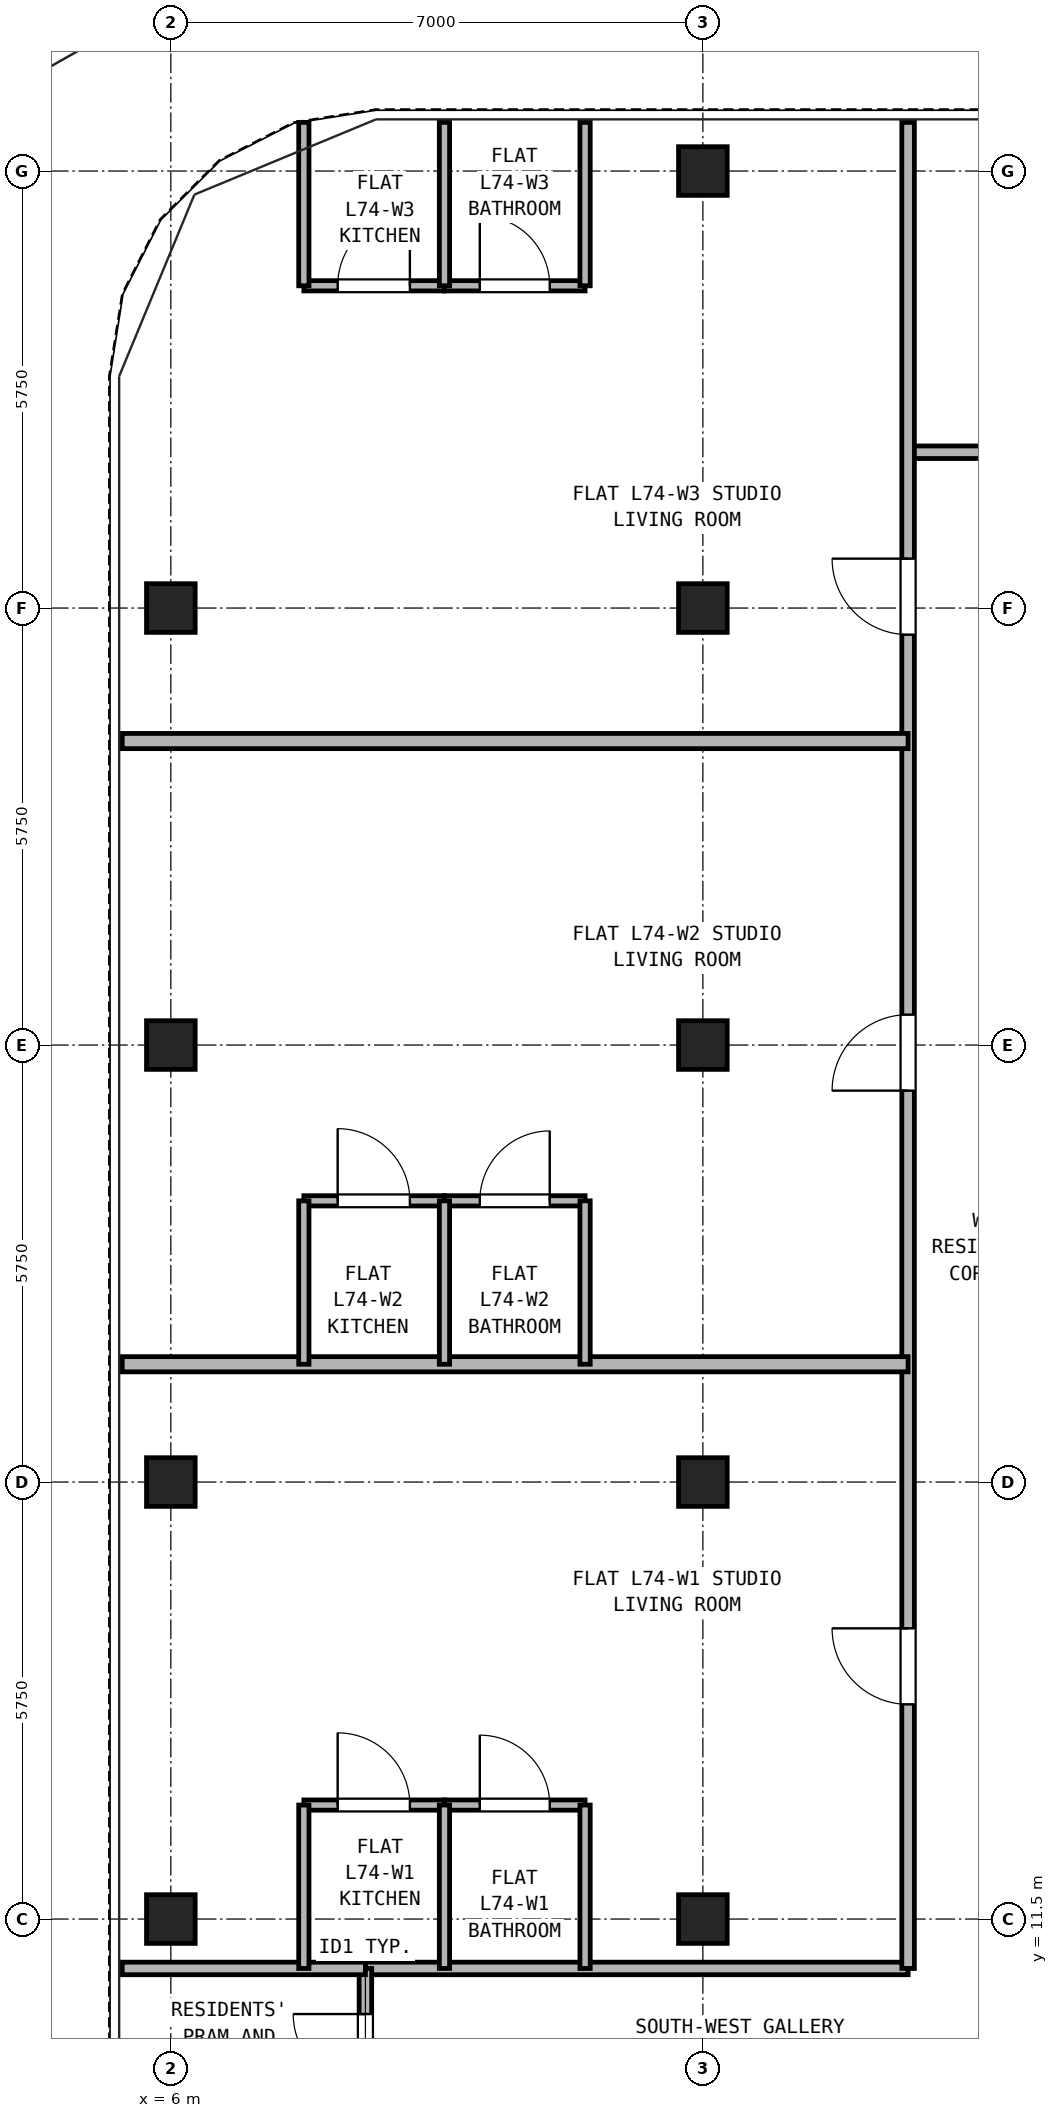
"""IFC4 building model, lengths in metres.
Left out: names, types, materials, properties, quantities, classifications, styles, units other than length and angle.
Written with IfcOpenShell. Run it as: python <this file> out.ifc"""

import sys

from ifc_helpers import new_model, si_unit, direction, frame, frame_2d, origin, origin_2d, place, context, subcontext, project, spatial, rectangle, hollow_rectangle, extrude, source, transform, mapped, element, fill, save


model = new_model("IFC4")
c1 = context("Model", 3, precision=1e-05, world=origin(), true_north=direction((0.0, 1.0)))
c2 = subcontext(c1, "Body", "Model", "MODEL_VIEW")
j1 = project(units=[si_unit("LENGTHUNIT", "METRE"), si_unit("PLANEANGLEUNIT", "RADIAN")], contexts=[c1])
p1 = place(None, origin())
s1 = spatial("IfcSite", under=j1, at=p1, CompositionType="ELEMENT")
p2 = place(p1, origin())
s2 = spatial("IfcBuilding", under=s1, at=p2, CompositionType="ELEMENT")
p3 = place(p2, frame((0.0, 0.0, 258.5)))
s3 = spatial("IfcBuildingStorey", under=s2, at=p3, CompositionType="ELEMENT", Elevation=258.5)
m1 = source(origin(), c2, "Body", "SweptSolid", [
    extrude(hollow_rectangle(XDim=0.64, YDim=0.64, WallThickness=0.035, at=origin_2d()), origin(), (0.0, 0.0, 1.0), 2.98),
])
for number, where, z_axis, x_axis in (
    (1, (13.0, 34.5, 0.0), (0.0, 0.0, 1.0), (1.0, 0.0, 0.0)),
    (2, (6.0, 11.5, 0.0), (0.0, 0.0, 1.0), (1.0, 0.0, 0.0)),
    (3, (6.0, 17.25, 0.0), (0.0, 0.0, 1.0), (1.0, 0.0, 0.0)),
    (4, (6.0, 23.0, 0.0), (0.0, 0.0, 1.0), (1.0, 0.0, 0.0)),
    (5, (6.0, 28.75, 0.0), (0.0, 0.0, 1.0), (1.0, 0.0, 0.0)),
    (6, (13.0, 11.5, 0.0), (0.0, 0.0, 1.0), (1.0, 0.0, 0.0)),
    (7, (13.0, 17.25, 0.0), (0.0, 0.0, 1.0), (1.0, 0.0, 0.0)),
    (8, (13.0, 23.0, 0.0), (0.0, 0.0, 1.0), (1.0, 0.0, 0.0)),
    (9, (13.0, 28.75, 0.0), (0.0, 0.0, 1.0), (1.0, 0.0, 0.0)),
):
    element("IfcColumn", number, at=place(p3, frame(where, z_axis=z_axis, x_axis=x_axis)), inside=s3, PredefinedType="COLUMN", context=c2, shape_type="MappedRepresentation", body=[
        mapped(m1, transform((0.0, 0.0, 0.0), x_axis=(1.0, 0.0, 0.0), y_axis=(0.0, 1.0, 0.0), z_axis=(0.0, 0.0, 1.0), scale=1.0)),
    ])
p4 = place(p3, frame((8.56, 10.85, 0.0), z_axis=(0.0, 0.0, 1.0), x_axis=(1.0, 0.0, 0.0)))
e10 = element("IfcWall", 10, at=p4, inside=s3, PredefinedType="PARTITIONING", context=c2, shape_type="SweptSolid", body=[
    extrude(rectangle(XDim=7.14, YDim=0.165, at=frame_2d((3.57, 0.0))), origin(), (0.0, 0.0, 1.0), 2.98),
])
p5 = place(p3, frame((8.56, 8.85, 0.0), z_axis=(0.0, 0.0, 1.0), x_axis=(0.0, 1.0, 0.0)))
e11 = element("IfcWall", 11, at=p5, inside=s3, PredefinedType="PARTITIONING", context=c2, shape_type="SweptSolid", body=[
    extrude(rectangle(XDim=2.0, YDim=0.165, at=frame_2d((1.0, 0.0))), origin(), (0.0, 0.0, 1.0), 2.98),
])
p6 = place(p5, frame((0.45, 0.0, 0.0)))
e12 = element("IfcOpeningElement", 12, at=p6, cuts=e11, PredefinedType="OPENING", context=c2, shape_type="SweptSolid", body=[
    extrude(rectangle(XDim=0.95, YDim=2.15, at=frame_2d((0.475, 1.075))), frame((0.0, 0.093, 0.0), z_axis=(0.0, -1.0, 0.0), x_axis=(1.0, 0.0, 0.0)), (0.0, 0.0, 1.0), 0.185),
])
p7 = place(p3, frame((15.7, 30.8, 0.0), z_axis=(0.0, 0.0, 1.0), x_axis=(1.0, 0.0, 0.0)))
e13 = element("IfcWall", 13, at=p7, inside=s3, PredefinedType="PARTITIONING", context=c2, shape_type="SweptSolid", body=[
    extrude(rectangle(XDim=15.6, YDim=0.165, at=frame_2d((7.8, 0.0))), origin(), (0.0, 0.0, 1.0), 2.98),
])
p8 = place(p7, frame((2.65, 0.0, 0.0)))
e14 = element("IfcOpeningElement", 14, at=p8, cuts=e13, PredefinedType="OPENING", context=c2, shape_type="SweptSolid", body=[
    extrude(rectangle(XDim=0.95, YDim=2.15, at=frame_2d((0.475, 1.075))), frame((0.0, 0.093, 0.0), z_axis=(0.0, -1.0, 0.0), x_axis=(1.0, 0.0, 0.0)), (0.0, 0.0, 1.0), 0.185),
])
p9 = place(p7, frame((7.85, 0.0, 0.0)))
e15 = element("IfcOpeningElement", 15, at=p9, cuts=e13, PredefinedType="OPENING", context=c2, shape_type="SweptSolid", body=[
    extrude(rectangle(XDim=0.95, YDim=2.15, at=frame_2d((0.475, 1.075))), frame((0.0, 0.093, 0.0), z_axis=(0.0, -1.0, 0.0), x_axis=(1.0, 0.0, 0.0)), (0.0, 0.0, 1.0), 0.185),
])
p10 = place(p7, frame((12.5, 0.0, 0.0)))
e16 = element("IfcOpeningElement", 16, at=p10, cuts=e13, PredefinedType="OPENING", context=c2, shape_type="SweptSolid", body=[
    extrude(rectangle(XDim=0.92, YDim=2.1, at=frame_2d((0.46, 1.05))), frame((0.0, 0.093, 0.0), z_axis=(0.0, -1.0, 0.0), x_axis=(1.0, 0.0, 0.0)), (0.0, 0.0, 1.0), 0.185),
])
p11 = place(p3, frame((15.7, 10.85, 0.0), z_axis=(0.0, 0.0, 1.0), x_axis=(0.0, 1.0, 0.0)))
e17 = element("IfcWall", 17, at=p11, inside=s3, PredefinedType="PARTITIONING", context=c2, shape_type="SweptSolid", body=[
    extrude(rectangle(XDim=24.29, YDim=0.165, at=frame_2d((12.145, 0.0))), origin(), (0.0, 0.0, 1.0), 2.98),
])
p12 = place(p11, frame((3.475, 0.0, 0.0)))
e18 = element("IfcOpeningElement", 18, at=p12, cuts=e17, PredefinedType="OPENING", context=c2, shape_type="SweptSolid", body=[
    extrude(rectangle(XDim=1.0, YDim=2.15, at=frame_2d((0.5, 1.075))), frame((0.0, 0.093, 0.0), z_axis=(0.0, -1.0, 0.0), x_axis=(1.0, 0.0, 0.0)), (0.0, 0.0, 1.0), 0.185),
])
p13 = place(p11, frame((11.55, 0.0, 0.0)))
e19 = element("IfcOpeningElement", 19, at=p13, cuts=e17, PredefinedType="OPENING", context=c2, shape_type="SweptSolid", body=[
    extrude(rectangle(XDim=1.0, YDim=2.15, at=frame_2d((0.5, 1.075))), frame((0.0, 0.093, 0.0), z_axis=(0.0, -1.0, 0.0), x_axis=(1.0, 0.0, 0.0)), (0.0, 0.0, 1.0), 0.185),
])
p14 = place(p11, frame((17.55, 0.0, 0.0)))
e20 = element("IfcOpeningElement", 20, at=p14, cuts=e17, PredefinedType="OPENING", context=c2, shape_type="SweptSolid", body=[
    extrude(rectangle(XDim=1.0, YDim=2.15, at=frame_2d((0.5, 1.075))), frame((0.0, 0.093, 0.0), z_axis=(0.0, -1.0, 0.0), x_axis=(1.0, 0.0, 0.0)), (0.0, 0.0, 1.0), 0.185),
])
p15 = place(p3, frame((5.36, 10.85, 0.0), z_axis=(0.0, 0.0, 1.0), x_axis=(1.0, 0.0, 0.0)))
e21 = element("IfcWall", 21, at=p15, inside=s3, PredefinedType="PARTITIONING", context=c2, shape_type="SweptSolid", body=[
    extrude(rectangle(XDim=3.2, YDim=0.165, at=frame_2d((1.6, 0.0))), origin(), (0.0, 0.0, 1.0), 2.98),
])
p16 = place(p3, frame((7.75, 13.0, 0.0), z_axis=(0.0, 0.0, 1.0), x_axis=(1.0, 0.0, 0.0)))
e22 = element("IfcWall", 22, at=p16, inside=s3, PredefinedType="PARTITIONING", context=c2, shape_type="SweptSolid", body=[
    extrude(rectangle(XDim=1.85, YDim=0.135, at=frame_2d((0.925, 0.0))), origin(), (0.0, 0.0, 1.0), 2.98),
])
p17 = place(p16, frame((0.445, 0.0, 0.0)))
e23 = element("IfcOpeningElement", 23, at=p17, cuts=e22, PredefinedType="OPENING", context=c2, shape_type="SweptSolid", body=[
    extrude(rectangle(XDim=0.95, YDim=2.15, at=frame_2d((0.475, 1.075))), frame((0.0, 0.077, 0.0), z_axis=(0.0, -1.0, 0.0), x_axis=(1.0, 0.0, 0.0)), (0.0, 0.0, 1.0), 0.155),
])
p18 = place(p3, frame((9.6, 13.0, 0.0), z_axis=(0.0, 0.0, 1.0), x_axis=(1.0, 0.0, 0.0)))
e24 = element("IfcWall", 24, at=p18, inside=s3, PredefinedType="PARTITIONING", context=c2, shape_type="SweptSolid", body=[
    extrude(rectangle(XDim=1.85, YDim=0.135, at=frame_2d((0.925, 0.0))), origin(), (0.0, 0.0, 1.0), 2.98),
])
p19 = place(p18, frame((0.465, 0.0, 0.0)))
e25 = element("IfcOpeningElement", 25, at=p19, cuts=e24, PredefinedType="OPENING", context=c2, shape_type="SweptSolid", body=[
    extrude(rectangle(XDim=0.92, YDim=2.1, at=frame_2d((0.46, 1.05))), frame((0.0, 0.077, 0.0), z_axis=(0.0, -1.0, 0.0), x_axis=(1.0, 0.0, 0.0)), (0.0, 0.0, 1.0), 0.155),
])
for number, where, z_axis, x_axis in (
    (26, (7.75, 10.85, 0.0), (0.0, 0.0, 1.0), (0.0, 1.0, 0.0)),
    (27, (9.6, 10.85, 0.0), (0.0, 0.0, 1.0), (0.0, 1.0, 0.0)),
    (28, (11.45, 10.85, 0.0), (0.0, 0.0, 1.0), (0.0, 1.0, 0.0)),
):
    element("IfcWall", number, at=place(p3, frame(where, z_axis=z_axis, x_axis=x_axis)), inside=s3, PredefinedType="PARTITIONING", context=c2, shape_type="SweptSolid", body=[
        extrude(rectangle(XDim=2.15, YDim=0.135, at=frame_2d((1.075, 0.0))), origin(), (0.0, 0.0, 1.0), 2.98),
    ])
p20 = place(p3, frame((5.36, 18.8, 0.0), z_axis=(0.0, 0.0, 1.0), x_axis=(1.0, 0.0, 0.0)))
e29 = element("IfcWall", 29, at=p20, inside=s3, PredefinedType="PARTITIONING", context=c2, shape_type="SweptSolid", body=[
    extrude(rectangle(XDim=10.34, YDim=0.2, at=frame_2d((5.17, 0.0))), origin(), (0.0, 0.0, 1.0), 2.98),
])
p21 = place(p3, frame((7.75, 20.95, 0.0), z_axis=(0.0, 0.0, 1.0), x_axis=(1.0, 0.0, 0.0)))
e30 = element("IfcWall", 30, at=p21, inside=s3, PredefinedType="PARTITIONING", context=c2, shape_type="SweptSolid", body=[
    extrude(rectangle(XDim=1.85, YDim=0.135, at=frame_2d((0.925, 0.0))), origin(), (0.0, 0.0, 1.0), 2.98),
])
p22 = place(p21, frame((0.445, 0.0, 0.0)))
e31 = element("IfcOpeningElement", 31, at=p22, cuts=e30, PredefinedType="OPENING", context=c2, shape_type="SweptSolid", body=[
    extrude(rectangle(XDim=0.95, YDim=2.15, at=frame_2d((0.475, 1.075))), frame((0.0, 0.077, 0.0), z_axis=(0.0, -1.0, 0.0), x_axis=(1.0, 0.0, 0.0)), (0.0, 0.0, 1.0), 0.155),
])
p23 = place(p3, frame((9.6, 20.95, 0.0), z_axis=(0.0, 0.0, 1.0), x_axis=(1.0, 0.0, 0.0)))
e32 = element("IfcWall", 32, at=p23, inside=s3, PredefinedType="PARTITIONING", context=c2, shape_type="SweptSolid", body=[
    extrude(rectangle(XDim=1.85, YDim=0.135, at=frame_2d((0.925, 0.0))), origin(), (0.0, 0.0, 1.0), 2.98),
])
p24 = place(p23, frame((0.465, 0.0, 0.0)))
e33 = element("IfcOpeningElement", 33, at=p24, cuts=e32, PredefinedType="OPENING", context=c2, shape_type="SweptSolid", body=[
    extrude(rectangle(XDim=0.92, YDim=2.1, at=frame_2d((0.46, 1.05))), frame((0.0, 0.077, 0.0), z_axis=(0.0, -1.0, 0.0), x_axis=(1.0, 0.0, 0.0)), (0.0, 0.0, 1.0), 0.155),
])
for number, where, z_axis, x_axis in (
    (34, (7.75, 18.8, 0.0), (0.0, 0.0, 1.0), (0.0, 1.0, 0.0)),
    (35, (9.6, 18.8, 0.0), (0.0, 0.0, 1.0), (0.0, 1.0, 0.0)),
    (36, (11.45, 18.8, 0.0), (0.0, 0.0, 1.0), (0.0, 1.0, 0.0)),
):
    element("IfcWall", number, at=place(p3, frame(where, z_axis=z_axis, x_axis=x_axis)), inside=s3, PredefinedType="PARTITIONING", context=c2, shape_type="SweptSolid", body=[
        extrude(rectangle(XDim=2.15, YDim=0.135, at=frame_2d((1.075, 0.0))), origin(), (0.0, 0.0, 1.0), 2.98),
    ])
p25 = place(p3, frame((5.36, 27.0, 0.0), z_axis=(0.0, 0.0, 1.0), x_axis=(1.0, 0.0, 0.0)))
e37 = element("IfcWall", 37, at=p25, inside=s3, PredefinedType="PARTITIONING", context=c2, shape_type="SweptSolid", body=[
    extrude(rectangle(XDim=10.34, YDim=0.2, at=frame_2d((5.17, 0.0))), origin(), (0.0, 0.0, 1.0), 2.98),
])
p26 = place(p3, frame((7.75, 32.99, 0.0), z_axis=(0.0, 0.0, 1.0), x_axis=(1.0, 0.0, 0.0)))
e38 = element("IfcWall", 38, at=p26, inside=s3, PredefinedType="PARTITIONING", context=c2, shape_type="SweptSolid", body=[
    extrude(rectangle(XDim=1.85, YDim=0.135, at=frame_2d((0.925, 0.0))), origin(), (0.0, 0.0, 1.0), 2.98),
])
p27 = place(p26, frame((0.445, 0.0, 0.0)))
e39 = element("IfcOpeningElement", 39, at=p27, cuts=e38, PredefinedType="OPENING", context=c2, shape_type="SweptSolid", body=[
    extrude(rectangle(XDim=0.95, YDim=2.15, at=frame_2d((0.475, 1.075))), frame((0.0, 0.077, 0.0), z_axis=(0.0, -1.0, 0.0), x_axis=(1.0, 0.0, 0.0)), (0.0, 0.0, 1.0), 0.155),
])
p28 = place(p3, frame((9.6, 32.99, 0.0), z_axis=(0.0, 0.0, 1.0), x_axis=(1.0, 0.0, 0.0)))
e40 = element("IfcWall", 40, at=p28, inside=s3, PredefinedType="PARTITIONING", context=c2, shape_type="SweptSolid", body=[
    extrude(rectangle(XDim=1.85, YDim=0.135, at=frame_2d((0.925, 0.0))), origin(), (0.0, 0.0, 1.0), 2.98),
])
p29 = place(p28, frame((0.465, 0.0, 0.0)))
e41 = element("IfcOpeningElement", 41, at=p29, cuts=e40, PredefinedType="OPENING", context=c2, shape_type="SweptSolid", body=[
    extrude(rectangle(XDim=0.92, YDim=2.1, at=frame_2d((0.46, 1.05))), frame((0.0, 0.077, 0.0), z_axis=(0.0, -1.0, 0.0), x_axis=(1.0, 0.0, 0.0)), (0.0, 0.0, 1.0), 0.155),
])
for number, where, z_axis, x_axis in (
    (42, (7.75, 32.99, 0.0), (0.0, 0.0, 1.0), (0.0, 1.0, 0.0)),
    (43, (9.6, 32.99, 0.0), (0.0, 0.0, 1.0), (0.0, 1.0, 0.0)),
    (44, (11.45, 32.99, 0.0), (0.0, 0.0, 1.0), (0.0, 1.0, 0.0)),
):
    element("IfcWall", number, at=place(p3, frame(where, z_axis=z_axis, x_axis=x_axis)), inside=s3, PredefinedType="PARTITIONING", context=c2, shape_type="SweptSolid", body=[
        extrude(rectangle(XDim=2.15, YDim=0.135, at=frame_2d((1.075, 0.0))), origin(), (0.0, 0.0, 1.0), 2.98),
    ])
p30 = place(p6, frame((0.95, 0.0, 0.0), z_axis=(0.0, 0.0, 1.0), x_axis=(-1.0, 0.0, 0.0)))
e45 = element("IfcDoor", 45, at=p30, inside=s3, OperationType="SINGLE_SWING_RIGHT", PredefinedType="DOOR", context=c2, shape_type="SweptSolid", body=[
    extrude(rectangle(XDim=0.95, YDim=2.15, at=frame_2d((0.475, 1.075))), frame((0.0, 0.025, 0.0), z_axis=(0.0, -1.0, 0.0), x_axis=(1.0, 0.0, 0.0)), (0.0, 0.0, 1.0), 0.05),
])
fill(e12, e45)
p31 = place(p17, origin())
e46 = element("IfcDoor", 46, at=p31, inside=s3, OperationType="SINGLE_SWING_LEFT", PredefinedType="DOOR", context=c2, shape_type="SweptSolid", body=[
    extrude(rectangle(XDim=0.95, YDim=2.15, at=frame_2d((0.475, 1.075))), frame((0.0, 0.025, 0.0), z_axis=(0.0, -1.0, 0.0), x_axis=(1.0, 0.0, 0.0)), (0.0, 0.0, 1.0), 0.05),
])
fill(e23, e46)
p32 = place(p19, origin())
e47 = element("IfcDoor", 47, at=p32, inside=s3, OperationType="SINGLE_SWING_LEFT", PredefinedType="DOOR", context=c2, shape_type="SweptSolid", body=[
    extrude(rectangle(XDim=0.92, YDim=2.1, at=frame_2d((0.46, 1.05))), frame((0.0, 0.025, 0.0), z_axis=(0.0, -1.0, 0.0), x_axis=(1.0, 0.0, 0.0)), (0.0, 0.0, 1.0), 0.05),
])
fill(e25, e47)
p33 = place(p12, origin())
e48 = element("IfcDoor", 48, at=p33, inside=s3, OperationType="SINGLE_SWING_RIGHT", PredefinedType="DOOR", context=c2, shape_type="SweptSolid", body=[
    extrude(rectangle(XDim=1.0, YDim=2.15, at=frame_2d((0.5, 1.075))), frame((0.0, 0.025, 0.0), z_axis=(0.0, -1.0, 0.0), x_axis=(1.0, 0.0, 0.0)), (0.0, 0.0, 1.0), 0.05),
])
fill(e18, e48)
p34 = place(p22, origin())
e49 = element("IfcDoor", 49, at=p34, inside=s3, OperationType="SINGLE_SWING_LEFT", PredefinedType="DOOR", context=c2, shape_type="SweptSolid", body=[
    extrude(rectangle(XDim=0.95, YDim=2.15, at=frame_2d((0.475, 1.075))), frame((0.0, 0.025, 0.0), z_axis=(0.0, -1.0, 0.0), x_axis=(1.0, 0.0, 0.0)), (0.0, 0.0, 1.0), 0.05),
])
fill(e31, e49)
p35 = place(p24, origin())
e50 = element("IfcDoor", 50, at=p35, inside=s3, OperationType="SINGLE_SWING_RIGHT", PredefinedType="DOOR", context=c2, shape_type="SweptSolid", body=[
    extrude(rectangle(XDim=0.92, YDim=2.1, at=frame_2d((0.46, 1.05))), frame((0.0, 0.025, 0.0), z_axis=(0.0, -1.0, 0.0), x_axis=(1.0, 0.0, 0.0)), (0.0, 0.0, 1.0), 0.05),
])
fill(e33, e50)
p36 = place(p13, origin())
e51 = element("IfcDoor", 51, at=p36, inside=s3, OperationType="SINGLE_SWING_LEFT", PredefinedType="DOOR", context=c2, shape_type="SweptSolid", body=[
    extrude(rectangle(XDim=1.0, YDim=2.15, at=frame_2d((0.5, 1.075))), frame((0.0, 0.025, 0.0), z_axis=(0.0, -1.0, 0.0), x_axis=(1.0, 0.0, 0.0)), (0.0, 0.0, 1.0), 0.05),
])
fill(e19, e51)
p37 = place(p27, frame((0.95, 0.0, 0.0), z_axis=(0.0, 0.0, 1.0), x_axis=(-1.0, 0.0, 0.0)))
e52 = element("IfcDoor", 52, at=p37, inside=s3, OperationType="SINGLE_SWING_RIGHT", PredefinedType="DOOR", context=c2, shape_type="SweptSolid", body=[
    extrude(rectangle(XDim=0.95, YDim=2.15, at=frame_2d((0.475, 1.075))), frame((0.0, 0.025, 0.0), z_axis=(0.0, -1.0, 0.0), x_axis=(1.0, 0.0, 0.0)), (0.0, 0.0, 1.0), 0.05),
])
fill(e39, e52)
p38 = place(p29, frame((0.92, 0.0, 0.0), z_axis=(0.0, 0.0, 1.0), x_axis=(-1.0, 0.0, 0.0)))
e53 = element("IfcDoor", 53, at=p38, inside=s3, OperationType="SINGLE_SWING_LEFT", PredefinedType="DOOR", context=c2, shape_type="SweptSolid", body=[
    extrude(rectangle(XDim=0.92, YDim=2.1, at=frame_2d((0.46, 1.05))), frame((0.0, 0.025, 0.0), z_axis=(0.0, -1.0, 0.0), x_axis=(1.0, 0.0, 0.0)), (0.0, 0.0, 1.0), 0.05),
])
fill(e41, e53)
p39 = place(p14, origin())
e54 = element("IfcDoor", 54, at=p39, inside=s3, OperationType="SINGLE_SWING_RIGHT", PredefinedType="DOOR", context=c2, shape_type="SweptSolid", body=[
    extrude(rectangle(XDim=1.0, YDim=2.15, at=frame_2d((0.5, 1.075))), frame((0.0, 0.025, 0.0), z_axis=(0.0, -1.0, 0.0), x_axis=(1.0, 0.0, 0.0)), (0.0, 0.0, 1.0), 0.05),
])
fill(e20, e54)
save(model, sys.argv[1])
